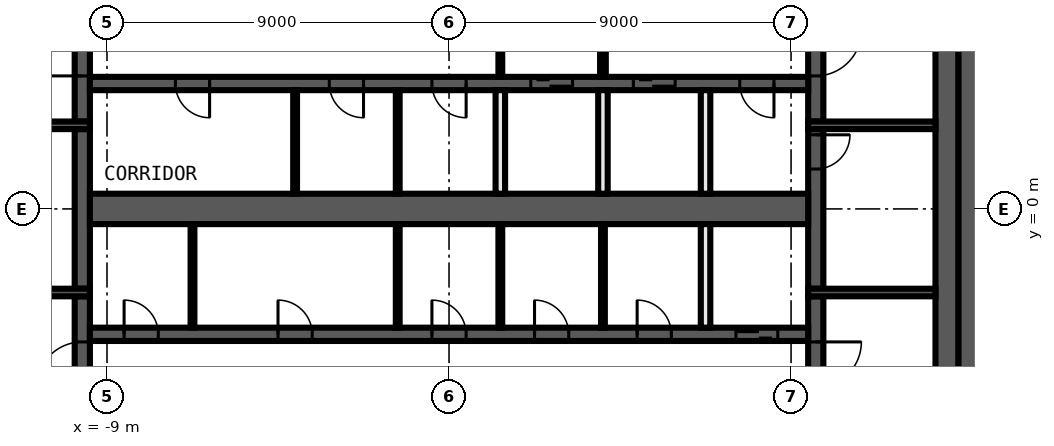
"""IFC4 building model, lengths in metres.
Left out: names, types, materials, properties, quantities, classifications, styles, units other than length and angle.
Written with IfcOpenShell. Run it as: python <this file> out.ifc"""

import sys

from ifc_helpers import new_model, si_unit, direction, frame, frame_2d, origin, place, context, subcontext, project, spatial, rectangle, extrude, element, fill, save


model = new_model("IFC4")
c1 = context("Model", 3, precision=1e-05, world=origin(), true_north=direction((0.0, 1.0)))
c2 = subcontext(c1, "Body", "Model", "MODEL_VIEW")
j1 = project(units=[si_unit("LENGTHUNIT", "METRE"), si_unit("PLANEANGLEUNIT", "RADIAN")], contexts=[c1])
p1 = place(None, origin())
s1 = spatial("IfcSite", under=j1, at=p1, CompositionType="ELEMENT")
p2 = place(p1, origin())
s2 = spatial("IfcBuilding", under=s1, at=p2, CompositionType="ELEMENT")
p3 = place(p2, frame((0.0, 0.0, 298.4)))
s3 = spatial("IfcBuildingStorey", under=s2, at=p3, CompositionType="ELEMENT", Elevation=298.4)
p4 = place(p3, frame((13.7, 10.4, 0.0), z_axis=(0.0, 0.0, 1.0), x_axis=(0.0, -1.0, 0.0)))
e1 = element("IfcWall", 1, at=p4, inside=s3, PredefinedType="SHEAR", context=c2, shape_type="SweptSolid", body=[
    extrude(rectangle(XDim=20.8, YDim=0.6, at=frame_2d((10.4, 0.0))), origin(), (0.0, 0.0, 1.0), 3.82),
])
p5 = place(p3, frame((13.1, 9.8, 0.0), z_axis=(0.0, 0.0, 1.0), x_axis=(0.0, -1.0, 0.0)))
e2 = element("IfcWall", 2, at=p5, inside=s3, PredefinedType="SHEAR", context=c2, shape_type="SweptSolid", body=[
    extrude(rectangle(XDim=19.6, YDim=0.6, at=frame_2d((9.8, 0.0))), origin(), (0.0, 0.0, 1.0), 3.82),
])
p6 = place(p3, frame((9.65, -2.3, 0.0), z_axis=(0.0, 0.0, 1.0), x_axis=(0.0, -1.0, 0.0)))
e3 = element("IfcWall", 3, at=p6, inside=s3, PredefinedType="SHEAR", context=c2, shape_type="SweptSolid", body=[
    extrude(rectangle(XDim=7.5, YDim=0.4, at=frame_2d((3.75, 0.0))), origin(), (0.0, 0.0, 1.0), 3.82),
])
p7 = place(p6, frame((1.2, 0.0, 0.0)))
e4 = element("IfcOpeningElement", 4, at=p7, cuts=e3, PredefinedType="OPENING", context=c2, shape_type="SweptSolid", body=[
    extrude(rectangle(XDim=1.2, YDim=2.1, at=frame_2d((0.6, 1.05))), frame((0.0, 0.21, 0.0), z_axis=(0.0, -1.0, 0.0), x_axis=(1.0, 0.0, 0.0)), (0.0, 0.0, 1.0), 0.42),
])
p8 = place(p3, frame((9.65, 2.1, 0.0), z_axis=(0.0, 0.0, 1.0), x_axis=(0.0, -1.0, 0.0)))
e5 = element("IfcWall", 5, at=p8, inside=s3, PredefinedType="SHEAR", context=c2, shape_type="SweptSolid", body=[
    extrude(rectangle(XDim=4.2, YDim=0.4, at=frame_2d((2.1, 0.0))), origin(), (0.0, 0.0, 1.0), 3.82),
])
p9 = place(p8, frame((0.15, 0.0, 0.0)))
e6 = element("IfcOpeningElement", 6, at=p9, cuts=e5, PredefinedType="OPENING", context=c2, shape_type="SweptSolid", body=[
    extrude(rectangle(XDim=0.9, YDim=2.1, at=frame_2d((0.45, 1.05))), frame((0.0, 0.21, 0.0), z_axis=(0.0, -1.0, 0.0), x_axis=(1.0, 0.0, 0.0)), (0.0, 0.0, 1.0), 0.42),
])
p10 = place(p3, frame((9.65, 9.8, 0.0), z_axis=(0.0, 0.0, 1.0), x_axis=(0.0, -1.0, 0.0)))
e7 = element("IfcWall", 7, at=p10, inside=s3, PredefinedType="SHEAR", context=c2, shape_type="SweptSolid", body=[
    extrude(rectangle(XDim=7.5, YDim=0.4, at=frame_2d((3.75, 0.0))), origin(), (0.0, 0.0, 1.0), 3.82),
])
p11 = place(p10, frame((5.1, 0.0, 0.0)))
e8 = element("IfcOpeningElement", 8, at=p11, cuts=e7, PredefinedType="OPENING", context=c2, shape_type="SweptSolid", body=[
    extrude(rectangle(XDim=1.2, YDim=2.1, at=frame_2d((0.6, 1.05))), frame((0.0, 0.21, 0.0), z_axis=(0.0, -1.0, 0.0), x_axis=(1.0, 0.0, 0.0)), (0.0, 0.0, 1.0), 0.42),
])
p12 = place(p3, frame((-9.65, -9.8, 0.0), z_axis=(0.0, 0.0, 1.0), x_axis=(0.0, 1.0, 0.0)))
e9 = element("IfcWall", 9, at=p12, inside=s3, PredefinedType="SHEAR", context=c2, shape_type="SweptSolid", body=[
    extrude(rectangle(XDim=7.5, YDim=0.4, at=frame_2d((3.75, 0.0))), origin(), (0.0, 0.0, 1.0), 3.82),
])
p13 = place(p12, frame((5.1, 0.0, 0.0)))
e10 = element("IfcOpeningElement", 10, at=p13, cuts=e9, PredefinedType="OPENING", context=c2, shape_type="SweptSolid", body=[
    extrude(rectangle(XDim=1.2, YDim=2.1, at=frame_2d((0.6, 1.05))), frame((0.0, 0.21, 0.0), z_axis=(0.0, -1.0, 0.0), x_axis=(1.0, 0.0, 0.0)), (0.0, 0.0, 1.0), 0.42),
])
p14 = place(p3, frame((-9.65, -2.1, 0.0), z_axis=(0.0, 0.0, 1.0), x_axis=(0.0, 1.0, 0.0)))
e11 = element("IfcWall", 11, at=p14, inside=s3, PredefinedType="SHEAR", context=c2, shape_type="SweptSolid", body=[
    extrude(rectangle(XDim=4.2, YDim=0.4, at=frame_2d((2.1, 0.0))), origin(), (0.0, 0.0, 1.0), 3.82),
])
p15 = place(p3, frame((-9.65, 2.3, 0.0), z_axis=(0.0, 0.0, 1.0), x_axis=(0.0, 1.0, 0.0)))
e12 = element("IfcWall", 12, at=p15, inside=s3, PredefinedType="SHEAR", context=c2, shape_type="SweptSolid", body=[
    extrude(rectangle(XDim=7.5, YDim=0.4, at=frame_2d((3.75, 0.0))), origin(), (0.0, 0.0, 1.0), 3.82),
])
p16 = place(p15, frame((1.2, 0.0, 0.0)))
e13 = element("IfcOpeningElement", 13, at=p16, cuts=e12, PredefinedType="OPENING", context=c2, shape_type="SweptSolid", body=[
    extrude(rectangle(XDim=1.2, YDim=2.1, at=frame_2d((0.6, 1.05))), frame((0.0, 0.21, 0.0), z_axis=(0.0, -1.0, 0.0), x_axis=(1.0, 0.0, 0.0)), (0.0, 0.0, 1.0), 0.42),
])
for number, where, z_axis, x_axis in (
    (14, (9.45, 2.2, 0.0), (0.0, 0.0, 1.0), (1.0, 0.0, 0.0)),
    (15, (-9.45, 2.2, 0.0), (0.0, 0.0, 1.0), (-1.0, 0.0, 0.0)),
    (16, (9.45, -2.2, 0.0), (0.0, 0.0, 1.0), (1.0, 0.0, 0.0)),
    (17, (-9.45, -2.2, 0.0), (0.0, 0.0, 1.0), (-1.0, 0.0, 0.0)),
):
    element("IfcWall", number, at=place(p3, frame(where, z_axis=z_axis, x_axis=x_axis)), inside=s3, PredefinedType="SHEAR", context=c2, shape_type="SweptSolid", body=[
        extrude(rectangle(XDim=3.35, YDim=0.2, at=frame_2d((1.675, 0.0))), origin(), (0.0, 0.0, 1.0), 3.82),
    ])
p17 = place(p3, frame((9.45, 3.3, 0.0), z_axis=(0.0, 0.0, 1.0), x_axis=(-1.0, 0.0, 0.0)))
e18 = element("IfcWall", 18, at=p17, inside=s3, PredefinedType="SHEAR", context=c2, shape_type="SweptSolid", body=[
    extrude(rectangle(XDim=18.9, YDim=0.35, at=frame_2d((9.45, 0.0))), origin(), (0.0, 0.0, 1.0), 3.82),
])
p18 = place(p17, frame((6.2, 0.0, 0.0)))
e19 = element("IfcOpeningElement", 19, at=p18, cuts=e18, PredefinedType="OPENING", context=c2, shape_type="SweptSolid", body=[
    extrude(rectangle(XDim=1.1, YDim=2.1, at=frame_2d((0.55, 1.05))), frame((0.0, 0.185, 0.0), z_axis=(0.0, -1.0, 0.0), x_axis=(1.0, 0.0, 0.0)), (0.0, 0.0, 1.0), 0.37),
])
p19 = place(p17, frame((3.5, 0.0, 0.0)))
e20 = element("IfcOpeningElement", 20, at=p19, cuts=e18, PredefinedType="OPENING", context=c2, shape_type="SweptSolid", body=[
    extrude(rectangle(XDim=1.1, YDim=2.1, at=frame_2d((0.55, 1.05))), frame((0.0, 0.185, 0.0), z_axis=(0.0, -1.0, 0.0), x_axis=(1.0, 0.0, 0.0)), (0.0, 0.0, 1.0), 0.37),
])
p20 = place(p17, frame((0.9, 0.0, 0.0)))
e21 = element("IfcOpeningElement", 21, at=p20, cuts=e18, PredefinedType="OPENING", context=c2, shape_type="SweptSolid", body=[
    extrude(rectangle(XDim=0.9, YDim=2.1, at=frame_2d((0.45, 1.05))), frame((0.0, 0.185, 0.0), z_axis=(0.0, -1.0, 0.0), x_axis=(1.0, 0.0, 0.0)), (0.0, 0.0, 1.0), 0.37),
])
p21 = place(p17, frame((15.75, 0.0, 0.0)))
e22 = element("IfcOpeningElement", 22, at=p21, cuts=e18, PredefinedType="OPENING", context=c2, shape_type="SweptSolid", body=[
    extrude(rectangle(XDim=0.9, YDim=2.1, at=frame_2d((0.45, 1.05))), frame((0.0, 0.185, 0.0), z_axis=(0.0, -1.0, 0.0), x_axis=(1.0, 0.0, 0.0)), (0.0, 0.0, 1.0), 0.37),
])
p22 = place(p17, frame((11.7, 0.0, 0.0)))
e23 = element("IfcOpeningElement", 23, at=p22, cuts=e18, PredefinedType="OPENING", context=c2, shape_type="SweptSolid", body=[
    extrude(rectangle(XDim=0.9, YDim=2.1, at=frame_2d((0.45, 1.05))), frame((0.0, 0.185, 0.0), z_axis=(0.0, -1.0, 0.0), x_axis=(1.0, 0.0, 0.0)), (0.0, 0.0, 1.0), 0.37),
])
p23 = place(p17, frame((9.0, 0.0, 0.0)))
e24 = element("IfcOpeningElement", 24, at=p23, cuts=e18, PredefinedType="OPENING", context=c2, shape_type="SweptSolid", body=[
    extrude(rectangle(XDim=0.9, YDim=2.1, at=frame_2d((0.45, 1.05))), frame((0.0, 0.185, 0.0), z_axis=(0.0, -1.0, 0.0), x_axis=(1.0, 0.0, 0.0)), (0.0, 0.0, 1.0), 0.37),
])
p24 = place(p3, frame((-9.45, -3.3, 0.0), z_axis=(0.0, 0.0, 1.0), x_axis=(1.0, 0.0, 0.0)))
e25 = element("IfcWall", 25, at=p24, inside=s3, PredefinedType="SHEAR", context=c2, shape_type="SweptSolid", body=[
    extrude(rectangle(XDim=18.9, YDim=0.35, at=frame_2d((9.45, 0.0))), origin(), (0.0, 0.0, 1.0), 3.82),
])
p25 = place(p24, frame((17.0, 0.0, 0.0)))
e26 = element("IfcOpeningElement", 26, at=p25, cuts=e25, PredefinedType="OPENING", context=c2, shape_type="SweptSolid", body=[
    extrude(rectangle(XDim=1.1, YDim=2.1, at=frame_2d((0.55, 1.05))), frame((0.0, 0.185, 0.0), z_axis=(0.0, -1.0, 0.0), x_axis=(1.0, 0.0, 0.0)), (0.0, 0.0, 1.0), 0.37),
])
p26 = place(p24, frame((0.9, 0.0, 0.0)))
e27 = element("IfcOpeningElement", 27, at=p26, cuts=e25, PredefinedType="OPENING", context=c2, shape_type="SweptSolid", body=[
    extrude(rectangle(XDim=0.9, YDim=2.1, at=frame_2d((0.45, 1.05))), frame((0.0, 0.185, 0.0), z_axis=(0.0, -1.0, 0.0), x_axis=(1.0, 0.0, 0.0)), (0.0, 0.0, 1.0), 0.37),
])
p27 = place(p24, frame((4.95, 0.0, 0.0)))
e28 = element("IfcOpeningElement", 28, at=p27, cuts=e25, PredefinedType="OPENING", context=c2, shape_type="SweptSolid", body=[
    extrude(rectangle(XDim=0.9, YDim=2.1, at=frame_2d((0.45, 1.05))), frame((0.0, 0.185, 0.0), z_axis=(0.0, -1.0, 0.0), x_axis=(1.0, 0.0, 0.0)), (0.0, 0.0, 1.0), 0.37),
])
p28 = place(p24, frame((9.0, 0.0, 0.0)))
e29 = element("IfcOpeningElement", 29, at=p28, cuts=e25, PredefinedType="OPENING", context=c2, shape_type="SweptSolid", body=[
    extrude(rectangle(XDim=0.9, YDim=2.1, at=frame_2d((0.45, 1.05))), frame((0.0, 0.185, 0.0), z_axis=(0.0, -1.0, 0.0), x_axis=(1.0, 0.0, 0.0)), (0.0, 0.0, 1.0), 0.37),
])
p29 = place(p24, frame((11.7, 0.0, 0.0)))
e30 = element("IfcOpeningElement", 30, at=p29, cuts=e25, PredefinedType="OPENING", context=c2, shape_type="SweptSolid", body=[
    extrude(rectangle(XDim=0.9, YDim=2.1, at=frame_2d((0.45, 1.05))), frame((0.0, 0.185, 0.0), z_axis=(0.0, -1.0, 0.0), x_axis=(1.0, 0.0, 0.0)), (0.0, 0.0, 1.0), 0.37),
])
p30 = place(p24, frame((14.4, 0.0, 0.0)))
e31 = element("IfcOpeningElement", 31, at=p30, cuts=e25, PredefinedType="OPENING", context=c2, shape_type="SweptSolid", body=[
    extrude(rectangle(XDim=0.9, YDim=2.1, at=frame_2d((0.45, 1.05))), frame((0.0, 0.185, 0.0), z_axis=(0.0, -1.0, 0.0), x_axis=(1.0, 0.0, 0.0)), (0.0, 0.0, 1.0), 0.37),
])
p31 = place(p3, frame((-9.45, 0.0, 0.0), z_axis=(0.0, 0.0, 1.0), x_axis=(1.0, 0.0, 0.0)))
e32 = element("IfcWall", 32, at=p31, inside=s3, PredefinedType="SHEAR", context=c2, shape_type="SweptSolid", body=[
    extrude(rectangle(XDim=18.9, YDim=0.8, at=frame_2d((9.45, 0.0))), origin(), (0.0, 0.0, 1.0), 3.82),
])
for number, where, z_axis, x_axis in (
    (33, (6.75, -3.125, 0.0), (0.0, 0.0, 1.0), (0.0, 1.0, 0.0)),
    (34, (6.75, 0.4, 0.0), (0.0, 0.0, 1.0), (0.0, 1.0, 0.0)),
):
    element("IfcWall", number, at=place(p3, frame(where, z_axis=z_axis, x_axis=x_axis)), inside=s3, PredefinedType="SOLIDWALL", context=c2, shape_type="SweptSolid", body=[
        extrude(rectangle(XDim=2.725, YDim=0.25, at=frame_2d((1.363, 0.0))), origin(), (0.0, 0.0, 1.0), 3.82),
    ])
p32 = place(p3, frame((4.05, 6.725, 0.0), z_axis=(0.0, 0.0, 1.0), x_axis=(0.0, -1.0, 0.0)))
e35 = element("IfcWall", 35, at=p32, inside=s3, PredefinedType="PARTITIONING", context=c2, shape_type="SweptSolid", body=[
    extrude(rectangle(XDim=3.25, YDim=0.15, at=frame_2d((1.625, 0.0))), origin(), (0.0, 0.0, 1.0), 3.82),
])
p33 = place(p32, frame((1.025, 0.0, 0.0)))
e36 = element("IfcOpeningElement", 36, at=p33, cuts=e35, PredefinedType="OPENING", context=c2, shape_type="SweptSolid", body=[
    extrude(rectangle(XDim=1.2, YDim=2.1, at=frame_2d((0.6, 1.05))), frame((0.0, 0.085, 0.0), z_axis=(0.0, -1.0, 0.0), x_axis=(1.0, 0.0, 0.0)), (0.0, 0.0, 1.0), 0.17),
])
p34 = place(p3, frame((4.05, -3.125, 0.0), z_axis=(0.0, 0.0, 1.0), x_axis=(0.0, 1.0, 0.0)))
e37 = element("IfcWall", 37, at=p34, inside=s3, PredefinedType="PARTITIONING", context=c2, shape_type="SweptSolid", body=[
    extrude(rectangle(XDim=2.725, YDim=0.1, at=frame_2d((1.363, 0.0))), origin(), (0.0, 0.0, 1.0), 3.82),
])
p35 = place(p3, frame((4.05, 0.4, 0.0), z_axis=(0.0, 0.0, 1.0), x_axis=(0.0, 1.0, 0.0)))
e38 = element("IfcWall", 38, at=p35, inside=s3, PredefinedType="SOLIDWALL", context=c2, shape_type="SweptSolid", body=[
    extrude(rectangle(XDim=2.725, YDim=0.25, at=frame_2d((1.363, 0.0))), origin(), (0.0, 0.0, 1.0), 3.82),
])
p36 = place(p3, frame((1.35, -3.125, 0.0), z_axis=(0.0, 0.0, 1.0), x_axis=(0.0, 1.0, 0.0)))
e39 = element("IfcWall", 39, at=p36, inside=s3, PredefinedType="PARTITIONING", context=c2, shape_type="SweptSolid", body=[
    extrude(rectangle(XDim=2.725, YDim=0.1, at=frame_2d((1.363, 0.0))), origin(), (0.0, 0.0, 1.0), 3.82),
])
p37 = place(p3, frame((1.35, 6.725, 0.0), z_axis=(0.0, 0.0, 1.0), x_axis=(0.0, -1.0, 0.0)))
e40 = element("IfcWall", 40, at=p37, inside=s3, PredefinedType="PARTITIONING", context=c2, shape_type="SweptSolid", body=[
    extrude(rectangle(XDim=3.25, YDim=0.1, at=frame_2d((1.625, 0.0))), origin(), (0.0, 0.0, 1.0), 3.82),
])
p38 = place(p37, frame((1.025, 0.0, 0.0)))
e41 = element("IfcOpeningElement", 41, at=p38, cuts=e40, PredefinedType="OPENING", context=c2, shape_type="SweptSolid", body=[
    extrude(rectangle(XDim=1.2, YDim=2.1, at=frame_2d((0.6, 1.05))), frame((0.0, 0.06, 0.0), z_axis=(0.0, -1.0, 0.0), x_axis=(1.0, 0.0, 0.0)), (0.0, 0.0, 1.0), 0.12),
])
p39 = place(p3, frame((1.35, 0.4, 0.0), z_axis=(0.0, 0.0, 1.0), x_axis=(0.0, 1.0, 0.0)))
e42 = element("IfcWall", 42, at=p39, inside=s3, PredefinedType="SOLIDWALL", context=c2, shape_type="SweptSolid", body=[
    extrude(rectangle(XDim=2.725, YDim=0.25, at=frame_2d((1.363, 0.0))), origin(), (0.0, 0.0, 1.0), 3.82),
])
for number, where, z_axis, x_axis in (
    (43, (-1.35, -3.125, 0.0), (0.0, 0.0, 1.0), (0.0, 1.0, 0.0)),
    (44, (-1.35, 0.4, 0.0), (0.0, 0.0, 1.0), (0.0, 1.0, 0.0)),
    (45, (-4.05, 0.4, 0.0), (0.0, 0.0, 1.0), (0.0, 1.0, 0.0)),
    (46, (-6.75, -3.125, 0.0), (0.0, 0.0, 1.0), (0.0, 1.0, 0.0)),
):
    element("IfcWall", number, at=place(p3, frame(where, z_axis=z_axis, x_axis=x_axis)), inside=s3, PredefinedType="PARTITIONING", context=c2, shape_type="SweptSolid", body=[
        extrude(rectangle(XDim=2.725, YDim=0.1, at=frame_2d((1.363, 0.0))), origin(), (0.0, 0.0, 1.0), 3.82),
    ])
p40 = place(p9, origin())
e47 = element("IfcDoor", 47, at=p40, inside=s3, OperationType="SINGLE_SWING_RIGHT", PredefinedType="DOOR", context=c2, shape_type="SweptSolid", body=[
    extrude(rectangle(XDim=0.9, YDim=2.1, at=frame_2d((0.45, 1.05))), frame((0.0, 0.025, 0.0), z_axis=(0.0, -1.0, 0.0), x_axis=(1.0, 0.0, 0.0)), (0.0, 0.0, 1.0), 0.05),
])
fill(e6, e47)
p41 = place(p18, origin())
e48 = element("IfcDoor", 48, at=p41, inside=s3, OperationType="DOUBLE_DOOR_SLIDING", PredefinedType="DOOR", context=c2, shape_type="SweptSolid", body=[
    extrude(rectangle(XDim=1.1, YDim=2.1, at=frame_2d((0.55, 1.05))), frame((0.0, 0.025, 0.0), z_axis=(0.0, -1.0, 0.0), x_axis=(1.0, 0.0, 0.0)), (0.0, 0.0, 1.0), 0.05),
])
fill(e19, e48)
p42 = place(p19, origin())
e49 = element("IfcDoor", 49, at=p42, inside=s3, OperationType="DOUBLE_DOOR_SLIDING", PredefinedType="DOOR", context=c2, shape_type="SweptSolid", body=[
    extrude(rectangle(XDim=1.1, YDim=2.1, at=frame_2d((0.55, 1.05))), frame((0.0, 0.025, 0.0), z_axis=(0.0, -1.0, 0.0), x_axis=(1.0, 0.0, 0.0)), (0.0, 0.0, 1.0), 0.05),
])
fill(e20, e49)
p43 = place(p20, origin())
e50 = element("IfcDoor", 50, at=p43, inside=s3, OperationType="SINGLE_SWING_LEFT", PredefinedType="DOOR", context=c2, shape_type="SweptSolid", body=[
    extrude(rectangle(XDim=0.9, YDim=2.1, at=frame_2d((0.45, 1.05))), frame((0.0, 0.025, 0.0), z_axis=(0.0, -1.0, 0.0), x_axis=(1.0, 0.0, 0.0)), (0.0, 0.0, 1.0), 0.05),
])
fill(e21, e50)
p44 = place(p25, origin())
e51 = element("IfcDoor", 51, at=p44, inside=s3, OperationType="DOUBLE_DOOR_SLIDING", PredefinedType="DOOR", context=c2, shape_type="SweptSolid", body=[
    extrude(rectangle(XDim=1.1, YDim=2.1, at=frame_2d((0.55, 1.05))), frame((0.0, 0.025, 0.0), z_axis=(0.0, -1.0, 0.0), x_axis=(1.0, 0.0, 0.0)), (0.0, 0.0, 1.0), 0.05),
])
fill(e26, e51)
p45 = place(p21, origin())
e52 = element("IfcDoor", 52, at=p45, inside=s3, OperationType="SINGLE_SWING_RIGHT", PredefinedType="DOOR", context=c2, shape_type="SweptSolid", body=[
    extrude(rectangle(XDim=0.9, YDim=2.1, at=frame_2d((0.45, 1.05))), frame((0.0, 0.025, 0.0), z_axis=(0.0, -1.0, 0.0), x_axis=(1.0, 0.0, 0.0)), (0.0, 0.0, 1.0), 0.05),
])
fill(e22, e52)
p46 = place(p22, origin())
e53 = element("IfcDoor", 53, at=p46, inside=s3, OperationType="SINGLE_SWING_LEFT", PredefinedType="DOOR", context=c2, shape_type="SweptSolid", body=[
    extrude(rectangle(XDim=0.9, YDim=2.1, at=frame_2d((0.45, 1.05))), frame((0.0, 0.025, 0.0), z_axis=(0.0, -1.0, 0.0), x_axis=(1.0, 0.0, 0.0)), (0.0, 0.0, 1.0), 0.05),
])
fill(e23, e53)
p47 = place(p23, origin())
e54 = element("IfcDoor", 54, at=p47, inside=s3, OperationType="SINGLE_SWING_RIGHT", PredefinedType="DOOR", context=c2, shape_type="SweptSolid", body=[
    extrude(rectangle(XDim=0.9, YDim=2.1, at=frame_2d((0.45, 1.05))), frame((0.0, 0.025, 0.0), z_axis=(0.0, -1.0, 0.0), x_axis=(1.0, 0.0, 0.0)), (0.0, 0.0, 1.0), 0.05),
])
fill(e24, e54)
p48 = place(p26, origin())
e55 = element("IfcDoor", 55, at=p48, inside=s3, OperationType="SINGLE_SWING_LEFT", PredefinedType="DOOR", context=c2, shape_type="SweptSolid", body=[
    extrude(rectangle(XDim=0.9, YDim=2.1, at=frame_2d((0.45, 1.05))), frame((0.0, 0.025, 0.0), z_axis=(0.0, -1.0, 0.0), x_axis=(1.0, 0.0, 0.0)), (0.0, 0.0, 1.0), 0.05),
])
fill(e27, e55)
p49 = place(p27, origin())
e56 = element("IfcDoor", 56, at=p49, inside=s3, OperationType="SINGLE_SWING_RIGHT", PredefinedType="DOOR", context=c2, shape_type="SweptSolid", body=[
    extrude(rectangle(XDim=0.9, YDim=2.1, at=frame_2d((0.45, 1.05))), frame((0.0, 0.025, 0.0), z_axis=(0.0, -1.0, 0.0), x_axis=(1.0, 0.0, 0.0)), (0.0, 0.0, 1.0), 0.05),
])
fill(e28, e56)
p50 = place(p28, origin())
e57 = element("IfcDoor", 57, at=p50, inside=s3, OperationType="SINGLE_SWING_LEFT", PredefinedType="DOOR", context=c2, shape_type="SweptSolid", body=[
    extrude(rectangle(XDim=0.9, YDim=2.1, at=frame_2d((0.45, 1.05))), frame((0.0, 0.025, 0.0), z_axis=(0.0, -1.0, 0.0), x_axis=(1.0, 0.0, 0.0)), (0.0, 0.0, 1.0), 0.05),
])
fill(e29, e57)
p51 = place(p29, origin())
e58 = element("IfcDoor", 58, at=p51, inside=s3, OperationType="SINGLE_SWING_RIGHT", PredefinedType="DOOR", context=c2, shape_type="SweptSolid", body=[
    extrude(rectangle(XDim=0.9, YDim=2.1, at=frame_2d((0.45, 1.05))), frame((0.0, 0.025, 0.0), z_axis=(0.0, -1.0, 0.0), x_axis=(1.0, 0.0, 0.0)), (0.0, 0.0, 1.0), 0.05),
])
fill(e30, e58)
p52 = place(p30, origin())
e59 = element("IfcDoor", 59, at=p52, inside=s3, OperationType="SINGLE_SWING_LEFT", PredefinedType="DOOR", context=c2, shape_type="SweptSolid", body=[
    extrude(rectangle(XDim=0.9, YDim=2.1, at=frame_2d((0.45, 1.05))), frame((0.0, 0.025, 0.0), z_axis=(0.0, -1.0, 0.0), x_axis=(1.0, 0.0, 0.0)), (0.0, 0.0, 1.0), 0.05),
])
fill(e31, e59)
p53 = place(p11, origin())
e60 = element("IfcDoor", 60, at=p53, inside=s3, OperationType="SINGLE_SWING_LEFT", PredefinedType="DOOR", context=c2, shape_type="SweptSolid", body=[
    extrude(rectangle(XDim=1.2, YDim=2.1, at=frame_2d((0.6, 1.05))), frame((0.0, 0.025, 0.0), z_axis=(0.0, -1.0, 0.0), x_axis=(1.0, 0.0, 0.0)), (0.0, 0.0, 1.0), 0.05),
])
fill(e8, e60)
p54 = place(p16, origin())
e61 = element("IfcDoor", 61, at=p54, inside=s3, OperationType="SINGLE_SWING_RIGHT", PredefinedType="DOOR", context=c2, shape_type="SweptSolid", body=[
    extrude(rectangle(XDim=1.2, YDim=2.1, at=frame_2d((0.6, 1.05))), frame((0.0, 0.025, 0.0), z_axis=(0.0, -1.0, 0.0), x_axis=(1.0, 0.0, 0.0)), (0.0, 0.0, 1.0), 0.05),
])
fill(e13, e61)
p55 = place(p7, origin())
e62 = element("IfcDoor", 62, at=p55, inside=s3, OperationType="SINGLE_SWING_RIGHT", PredefinedType="DOOR", context=c2, shape_type="SweptSolid", body=[
    extrude(rectangle(XDim=1.2, YDim=2.1, at=frame_2d((0.6, 1.05))), frame((0.0, 0.025, 0.0), z_axis=(0.0, -1.0, 0.0), x_axis=(1.0, 0.0, 0.0)), (0.0, 0.0, 1.0), 0.05),
])
fill(e4, e62)
p56 = place(p13, origin())
e63 = element("IfcDoor", 63, at=p56, inside=s3, OperationType="SINGLE_SWING_LEFT", PredefinedType="DOOR", context=c2, shape_type="SweptSolid", body=[
    extrude(rectangle(XDim=1.2, YDim=2.1, at=frame_2d((0.6, 1.05))), frame((0.0, 0.025, 0.0), z_axis=(0.0, -1.0, 0.0), x_axis=(1.0, 0.0, 0.0)), (0.0, 0.0, 1.0), 0.05),
])
fill(e10, e63)
save(model, sys.argv[1])
